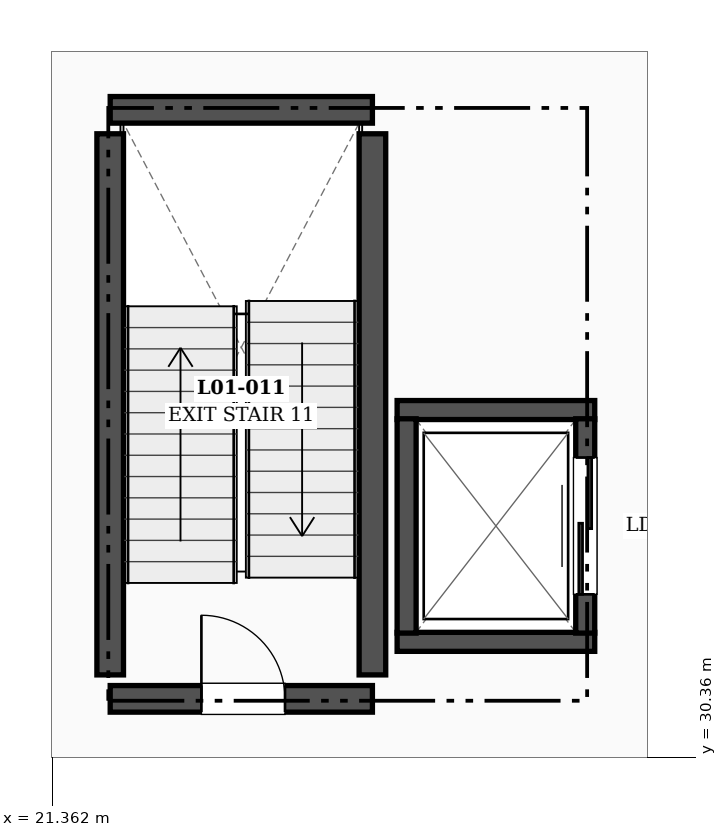
"""IFC4 building model, lengths in metres.
Left out: names, types, materials, properties, quantities, classifications, styles, units other than length and angle.
Written with IfcOpenShell. Run it as: python <this file> out.ifc"""

import sys

from ifc_helpers import new_model, si_unit, direction, frame, frame_2d, origin, place, context, subcontext, project, spatial, rectangle, extrude, element, fill, save


model = new_model("IFC4")
c1 = context("Model", 3, precision=1e-05, world=origin(), true_north=direction((0.0, 1.0)))
c2 = subcontext(c1, "Body", "Model", "MODEL_VIEW")
j1 = project(units=[si_unit("LENGTHUNIT", "METRE"), si_unit("PLANEANGLEUNIT", "RADIAN")], contexts=[c1])
p1 = place(None, origin())
s1 = spatial("IfcSite", under=j1, at=p1, CompositionType="ELEMENT")
p2 = place(p1, origin())
s2 = spatial("IfcBuilding", under=s1, at=p2, CompositionType="ELEMENT")
p3 = place(p2, frame((0.0, 0.0, 6.0)))
s3 = spatial("IfcBuildingStorey", under=s2, at=p3, CompositionType="ELEMENT", Elevation=6.0)
p4 = place(p3, frame((22.125, 31.125, 0.0), z_axis=(0.0, 0.0, 1.0), x_axis=(1.0, 0.0, 0.0)))
e1 = element("IfcWall", 1, at=p4, inside=s3, PredefinedType="SHEAR", context=c2, shape_type="SweptSolid", body=[
    extrude(rectangle(XDim=3.45, YDim=0.35, at=frame_2d((1.725, 0.0))), origin(), (0.0, 0.0, 1.0), 4.8),
])
p5 = place(p4, frame((1.2, 0.0, 0.0)))
e2 = element("IfcOpeningElement", 2, at=p5, cuts=e1, PredefinedType="OPENING", context=c2, shape_type="SweptSolid", body=[
    extrude(rectangle(XDim=1.1, YDim=2.2, at=frame_2d((0.55, 1.1))), frame((0.0, 0.185, 0.0), z_axis=(0.0, -1.0, 0.0), x_axis=(1.0, 0.0, 0.0)), (0.0, 0.0, 1.0), 0.37),
])
p6 = place(p3, frame((22.125, 38.875, 0.0), z_axis=(0.0, 0.0, 1.0), x_axis=(1.0, 0.0, 0.0)))
e3 = element("IfcWall", 3, at=p6, inside=s3, PredefinedType="SHEAR", context=c2, shape_type="SweptSolid", body=[
    extrude(rectangle(XDim=3.45, YDim=0.35, at=frame_2d((1.725, 0.0))), origin(), (0.0, 0.0, 1.0), 4.8),
])
for number, where, z_axis, x_axis in (
    (4, (22.125, 31.44, 0.0), (0.0, 0.0, 1.0), (0.0, 1.0, 0.0)),
    (5, (25.575, 31.44, 0.0), (0.0, 0.0, 1.0), (0.0, 1.0, 0.0)),
):
    element("IfcWall", number, at=place(p3, frame(where, z_axis=z_axis, x_axis=x_axis)), inside=s3, PredefinedType="SHEAR", context=c2, shape_type="SweptSolid", body=[
        extrude(rectangle(XDim=7.12, YDim=0.35, at=frame_2d((3.56, 0.0))), origin(), (0.0, 0.0, 1.0), 4.8),
    ])
for number, where, z_axis, x_axis in (
    (6, (25.9, 31.875, 0.0), (0.0, 0.0, 1.0), (1.0, 0.0, 0.0)),
    (7, (25.9, 34.925, 0.0), (0.0, 0.0, 1.0), (1.0, 0.0, 0.0)),
):
    element("IfcWall", number, at=place(p3, frame(where, z_axis=z_axis, x_axis=x_axis)), inside=s3, PredefinedType="SHEAR", context=c2, shape_type="SweptSolid", body=[
        extrude(rectangle(XDim=2.6, YDim=0.25, at=frame_2d((1.3, 0.0))), origin(), (0.0, 0.0, 1.0), 4.8),
    ])
p7 = place(p3, frame((26.025, 31.99, 0.0), z_axis=(0.0, 0.0, 1.0), x_axis=(0.0, 1.0, 0.0)))
e8 = element("IfcWall", 8, at=p7, inside=s3, PredefinedType="SHEAR", context=c2, shape_type="SweptSolid", body=[
    extrude(rectangle(XDim=2.82, YDim=0.25, at=frame_2d((1.41, 0.0))), origin(), (0.0, 0.0, 1.0), 4.8),
])
p8 = place(p3, frame((28.375, 31.99, 0.0), z_axis=(0.0, 0.0, 1.0), x_axis=(0.0, 1.0, 0.0)))
e9 = element("IfcWall", 9, at=p8, inside=s3, PredefinedType="SHEAR", context=c2, shape_type="SweptSolid", body=[
    extrude(rectangle(XDim=2.82, YDim=0.25, at=frame_2d((1.41, 0.0))), origin(), (0.0, 0.0, 1.0), 4.8),
])
p9 = place(p8, frame((0.51, 0.0, 0.0)))
e10 = element("IfcOpeningElement", 10, at=p9, cuts=e9, PredefinedType="OPENING", context=c2, shape_type="SweptSolid", body=[
    extrude(rectangle(XDim=1.8, YDim=2.4, at=frame_2d((0.9, 1.2))), frame((0.0, 0.135, 0.0), z_axis=(0.0, -1.0, 0.0), x_axis=(1.0, 0.0, 0.0)), (0.0, 0.0, 1.0), 0.27),
])
p10 = place(p5, origin())
e11 = element("IfcDoor", 11, at=p10, inside=s3, OperationType="SINGLE_SWING_LEFT", PredefinedType="DOOR", context=c2, shape_type="SweptSolid", body=[
    extrude(rectangle(XDim=1.1, YDim=2.2, at=frame_2d((0.55, 1.1))), frame((0.0, 0.025, 0.0), z_axis=(0.0, -1.0, 0.0), x_axis=(1.0, 0.0, 0.0)), (0.0, 0.0, 1.0), 0.05),
])
fill(e2, e11)
p11 = place(p9, origin())
e12 = element("IfcDoor", 12, at=p11, inside=s3, OperationType="DOUBLE_DOOR_SLIDING", PredefinedType="DOOR", context=c2, shape_type="SweptSolid", body=[
    extrude(rectangle(XDim=1.8, YDim=2.4, at=frame_2d((0.9, 1.2))), frame((0.0, 0.025, 0.0), z_axis=(0.0, -1.0, 0.0), x_axis=(1.0, 0.0, 0.0)), (0.0, 0.0, 1.0), 0.05),
])
fill(e10, e12)
save(model, sys.argv[1])
